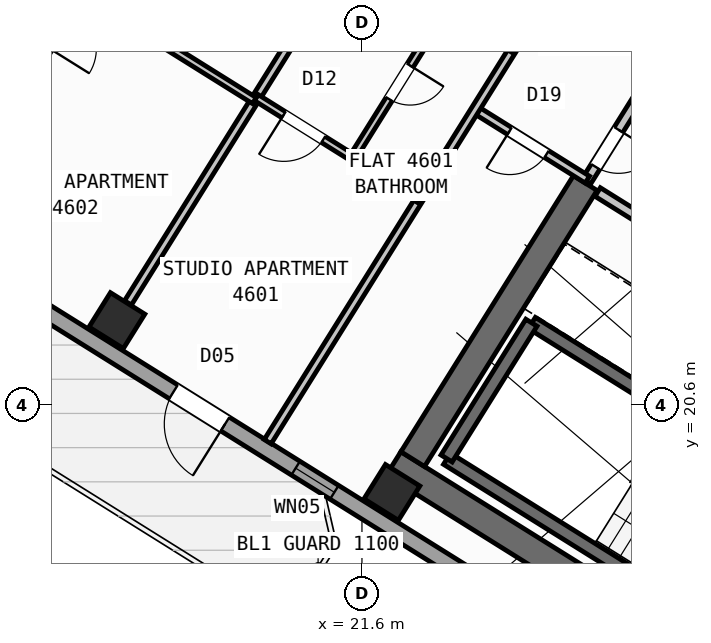
"""IFC4 building model, lengths in metres.
Left out: names, types, materials, properties, quantities, classifications, styles, units other than length and angle.
Written with IfcOpenShell. Run it as: python <this file> out.ifc"""

import sys

from ifc_helpers import new_model, si_unit, direction, frame, frame_2d, origin, origin_2d, place, context, subcontext, project, spatial, rectangle, hollow_rectangle, extrude, source, transform, mapped, element, fill, save


model = new_model("IFC4")
c1 = context("Model", 3, precision=1e-05, world=origin(), true_north=direction((0.0, 1.0)))
c2 = subcontext(c1, "Body", "Model", "MODEL_VIEW")
j1 = project(units=[si_unit("LENGTHUNIT", "METRE"), si_unit("PLANEANGLEUNIT", "RADIAN")], contexts=[c1])
p1 = place(None, origin())
s1 = spatial("IfcSite", under=j1, at=p1, CompositionType="ELEMENT")
p2 = place(p1, origin())
s2 = spatial("IfcBuilding", under=s1, at=p2, CompositionType="ELEMENT")
p3 = place(p2, frame((0.0, 0.0, 184.2)))
s3 = spatial("IfcBuildingStorey", under=s2, at=p3, CompositionType="ELEMENT", Elevation=184.2)
p4 = place(p3, frame((33.366, 12.477, 0.0), z_axis=(0.0, 0.0, 1.0), x_axis=(-0.848047359947, 0.529920442413, 0.0)))
e1 = element("IfcWall", 1, at=p4, inside=s3, PredefinedType="SHEAR", context=c2, shape_type="SweptSolid", body=[
    extrude(rectangle(XDim=13.14, YDim=0.55, at=frame_2d((6.57, 0.0))), origin(), (0.0, 0.0, 1.0), 3.35),
])
p5 = place(p3, frame((26.007, 24.976, 0.0), z_axis=(0.0, 0.0, 1.0), x_axis=(-0.529923795287, -0.848045264823, 0.0)))
e2 = element("IfcWall", 2, at=p5, inside=s3, PredefinedType="SHEAR", context=c2, shape_type="SweptSolid", body=[
    extrude(rectangle(XDim=6.425, YDim=0.55, at=frame_2d((3.212, 0.0))), origin(), (0.0, 0.0, 1.0), 3.35),
])
m1 = source(origin(), c2, "Body", "SweptSolid", [
    extrude(hollow_rectangle(XDim=0.8, YDim=0.8, WallThickness=0.032, at=origin_2d()), origin(), (0.0, 0.0, 1.0), 3.6),
])
for number, where, z_axis, x_axis in (
    (3, (22.191, 18.87, 0.0), (0.0, 0.0, 1.0), (-0.848, 0.53, 0.0)),
    (4, (16.764, 22.261, 0.0), (0.0, 0.0, 1.0), (-0.848, 0.53, 0.0)),
):
    element("IfcColumn", number, at=place(p3, frame(where, z_axis=z_axis, x_axis=x_axis)), inside=s3, PredefinedType="COLUMN", context=c2, shape_type="MappedRepresentation", body=[
        mapped(m1, transform((0.0, 0.0, 0.0), scale=1.0)),
    ])
p6 = place(p3, frame((31.76, 12.183, 0.0), z_axis=(0.0, 0.0, 1.0), x_axis=(-0.848047074256, 0.529920899612, 0.0)))
e5 = element("IfcWall", 5, at=p6, inside=s3, PredefinedType="STANDARD", context=c2, shape_type="SweptSolid", body=[
    extrude(rectangle(XDim=30.652, YDim=0.32, at=frame_2d((15.326, 0.0))), origin(), (0.0, 0.0, 1.0), 3.35),
])
p7 = place(p6, frame((15.166, 0.0, 0.0)))
e6 = element("IfcOpeningElement", 6, at=p7, cuts=e5, PredefinedType="OPENING", context=c2, shape_type="SweptSolid", body=[
    extrude(rectangle(XDim=1.2, YDim=2.15, at=frame_2d((0.6, 1.075))), frame((0.0, 0.17, 0.0), z_axis=(0.0, -1.0, 0.0), x_axis=(1.0, 0.0, 0.0)), (0.0, 0.0, 1.0), 0.34),
])
p8 = place(p6, frame((2.015, 0.0, 0.8)))
e7 = element("IfcOpeningElement", 7, at=p8, cuts=e5, PredefinedType="OPENING", context=c2, shape_type="SweptSolid", body=[
    extrude(rectangle(XDim=2.1, YDim=1.55, at=frame_2d((1.05, 0.775))), frame((0.0, 0.17, 0.0), z_axis=(0.0, -1.0, 0.0), x_axis=(1.0, 0.0, 0.0)), (0.0, 0.0, 1.0), 0.34),
])
p9 = place(p6, frame((7.244, 0.0, 0.8)))
e8 = element("IfcOpeningElement", 8, at=p9, cuts=e5, PredefinedType="OPENING", context=c2, shape_type="SweptSolid", body=[
    extrude(rectangle(XDim=2.1, YDim=1.55, at=frame_2d((1.05, 0.775))), frame((0.0, 0.17, 0.0), z_axis=(0.0, -1.0, 0.0), x_axis=(1.0, 0.0, 0.0)), (0.0, 0.0, 1.0), 0.34),
])
p10 = place(p6, frame((12.623, 0.0, 1.0)))
e9 = element("IfcOpeningElement", 9, at=p10, cuts=e5, PredefinedType="OPENING", context=c2, shape_type="SweptSolid", body=[
    extrude(rectangle(XDim=0.9, YDim=1.25, at=frame_2d((0.45, 0.625))), frame((0.0, 0.17, 0.0), z_axis=(0.0, -1.0, 0.0), x_axis=(1.0, 0.0, 0.0)), (0.0, 0.0, 1.0), 0.34),
])
p11 = place(p6, frame((19.565, 0.0, 0.95)))
e10 = element("IfcOpeningElement", 10, at=p11, cuts=e5, PredefinedType="OPENING", context=c2, shape_type="SweptSolid", body=[
    extrude(rectangle(XDim=1.2, YDim=1.4, at=frame_2d((0.6, 0.7))), frame((0.0, 0.17, 0.0), z_axis=(0.0, -1.0, 0.0), x_axis=(1.0, 0.0, 0.0)), (0.0, 0.0, 1.0), 0.34),
])
p12 = place(p6, frame((25.983, 0.0, 1.0)))
e11 = element("IfcOpeningElement", 11, at=p12, cuts=e5, PredefinedType="OPENING", context=c2, shape_type="SweptSolid", body=[
    extrude(rectangle(XDim=0.9, YDim=1.25, at=frame_2d((0.45, 0.625))), frame((0.0, 0.17, 0.0), z_axis=(0.0, -1.0, 0.0), x_axis=(1.0, 0.0, 0.0)), (0.0, 0.0, 1.0), 0.34),
])
p13 = place(p6, frame((28.433, 0.0, 1.0)))
e12 = element("IfcOpeningElement", 12, at=p13, cuts=e5, PredefinedType="OPENING", context=c2, shape_type="SweptSolid", body=[
    extrude(rectangle(XDim=0.9, YDim=1.25, at=frame_2d((0.45, 0.625))), frame((0.0, 0.17, 0.0), z_axis=(0.0, -1.0, 0.0), x_axis=(1.0, 0.0, 0.0)), (0.0, 0.0, 1.0), 0.34),
])
p14 = place(p3, frame((29.605, 15.581, 0.0), z_axis=(0.0, 0.0, 1.0), x_axis=(-0.848036911448, 0.529937163087, 0.0)))
e13 = element("IfcWall", 13, at=p14, inside=s3, PredefinedType="SHEAR", context=c2, shape_type="SweptSolid", body=[
    extrude(rectangle(XDim=7.46, YDim=0.26, at=frame_2d((3.73, 0.0))), origin(), (0.0, 0.0, 1.0), 3.35),
])
p15 = place(p3, frame((31.28, 18.261, 0.0), z_axis=(0.0, 0.0, 1.0), x_axis=(-0.848051618787, 0.529913626805, 0.0)))
e14 = element("IfcWall", 14, at=p15, inside=s3, PredefinedType="SHEAR", context=c2, shape_type="SweptSolid", body=[
    extrude(rectangle(XDim=7.46, YDim=0.26, at=frame_2d((3.73, 0.0))), origin(), (0.0, 0.0, 1.0), 3.35),
])
p16 = place(p15, frame((0.36, 0.0, 0.0)))
e15 = element("IfcOpeningElement", 15, at=p16, cuts=e14, PredefinedType="OPENING", context=c2, shape_type="SweptSolid", body=[
    extrude(rectangle(XDim=0.86, YDim=2.05, at=frame_2d((0.43, 1.025))), frame((0.0, 0.14, 0.0), z_axis=(0.0, -1.0, 0.0), x_axis=(1.0, 0.0, 0.0)), (0.0, 0.0, 1.0), 0.28),
])
p17 = place(p3, frame((24.945, 22.22, 0.0), z_axis=(0.0, 0.0, 1.0), x_axis=(-0.529908658664, -0.84805472316, 0.0)))
e16 = element("IfcWall", 16, at=p17, inside=s3, PredefinedType="SHEAR", context=c2, shape_type="SweptSolid", body=[
    extrude(rectangle(XDim=3.16, YDim=0.26, at=frame_2d((1.58, 0.0))), origin(), (0.0, 0.0, 1.0), 3.35),
])
p18 = place(p3, frame((31.525, 21.504, 0.0), z_axis=(0.0, 0.0, 1.0), x_axis=(-0.848040211232, 0.529931882541, 0.0)))
e17 = element("IfcWall", 17, at=p18, inside=s3, PredefinedType="STANDARD", context=c2, shape_type="SweptSolid", body=[
    extrude(rectangle(XDim=6.218, YDim=0.2, at=frame_2d((3.109, 0.0))), origin(), (0.0, 0.0, 1.0), 3.34),
])
p19 = place(p18, frame((4.4, 0.0, 0.0)))
e18 = element("IfcOpeningElement", 18, at=p19, cuts=e17, PredefinedType="OPENING", context=c2, shape_type="SweptSolid", body=[
    extrude(rectangle(XDim=0.86, YDim=2.05, at=frame_2d((0.43, 1.025))), frame((0.0, 0.11, 0.0), z_axis=(0.0, -1.0, 0.0), x_axis=(1.0, 0.0, 0.0)), (0.0, 0.0, 1.0), 0.22),
])
p20 = place(p18, frame((1.45, 0.0, 0.0)))
e19 = element("IfcOpeningElement", 19, at=p20, cuts=e17, PredefinedType="OPENING", context=c2, shape_type="SweptSolid", body=[
    extrude(rectangle(XDim=0.86, YDim=2.05, at=frame_2d((0.43, 1.025))), frame((0.0, 0.11, 0.0), z_axis=(0.0, -1.0, 0.0), x_axis=(1.0, 0.0, 0.0)), (0.0, 0.0, 1.0), 0.22),
])
p21 = place(p3, frame((27.596, 27.52, 0.0), z_axis=(0.0, 0.0, 1.0), x_axis=(-0.529865479138, -0.848081702443, 0.0)))
e20 = element("IfcWall", 20, at=p21, inside=s3, PredefinedType="STANDARD", context=c2, shape_type="SweptSolid", body=[
    extrude(rectangle(XDim=2.96, YDim=0.2, at=frame_2d((1.48, 0.0))), origin(), (0.0, 0.0, 1.0), 3.34),
])
p22 = place(p21, frame((1.76, 0.0, 0.0)))
e21 = element("IfcOpeningElement", 21, at=p22, cuts=e20, PredefinedType="OPENING", context=c2, shape_type="SweptSolid", body=[
    extrude(rectangle(XDim=0.86, YDim=2.05, at=frame_2d((0.43, 1.025))), frame((0.0, 0.11, 0.0), z_axis=(0.0, -1.0, 0.0), x_axis=(1.0, 0.0, 0.0)), (0.0, 0.0, 1.0), 0.22),
])
p23 = place(p3, frame((26.049, 25.044, 0.0), z_axis=(0.0, 0.0, 1.0), x_axis=(-0.848050851465, 0.529914854792, 0.0)))
e22 = element("IfcWall", 22, at=p23, inside=s3, PredefinedType="PARTITIONING", context=c2, shape_type="SweptSolid", body=[
    extrude(rectangle(XDim=2.61, YDim=0.16, at=frame_2d((1.305, 0.0))), origin(), (0.0, 0.0, 1.0), 2.825),
])
p24 = place(p23, frame((0.95, 0.0, 0.0)))
e23 = element("IfcOpeningElement", 23, at=p24, cuts=e22, PredefinedType="OPENING", context=c2, shape_type="SweptSolid", body=[
    extrude(rectangle(XDim=0.86, YDim=2.05, at=frame_2d((0.43, 1.025))), frame((0.0, 0.09, 0.0), z_axis=(0.0, -1.0, 0.0), x_axis=(1.0, 0.0, 0.0)), (0.0, 0.0, 1.0), 0.18),
])
p25 = place(p3, frame((24.588, 27.631, 0.0), z_axis=(0.0, 0.0, 1.0), x_axis=(-0.529914992377, -0.848050765494, 0.0)))
e24 = element("IfcWall", 24, at=p25, inside=s3, PredefinedType="PARTITIONING", context=c2, shape_type="SweptSolid", body=[
    extrude(rectangle(XDim=9.15, YDim=0.16, at=frame_2d((4.575, 0.0))), origin(), (0.0, 0.0, 1.0), 3.34),
])
p26 = place(p3, frame((20.414, 28.103, 0.0), z_axis=(0.0, 0.0, 1.0), x_axis=(-0.529934553702, -0.848038542045, 0.0)))
e25 = element("IfcWall", 25, at=p26, inside=s3, PredefinedType="PARTITIONING", context=c2, shape_type="SweptSolid", body=[
    extrude(rectangle(XDim=6.476, YDim=0.16, at=frame_2d((3.238, 0.0))), origin(), (0.0, 0.0, 1.0), 2.825),
])
p27 = place(p3, frame((22.728, 24.654, 0.0), z_axis=(0.0, 0.0, 1.0), x_axis=(-0.848059820872, 0.529900500304, 0.0)))
e26 = element("IfcWall", 26, at=p27, inside=s3, PredefinedType="PLUMBINGWALL", context=c2, shape_type="SweptSolid", body=[
    extrude(rectangle(XDim=3.79, YDim=0.14, at=frame_2d((1.895, 0.0))), origin(), (0.0, 0.0, 1.0), 3.34),
])
p28 = place(p27, frame((2.23, 0.0, 0.0)))
e27 = element("IfcOpeningElement", 27, at=p28, cuts=e26, PredefinedType="OPENING", context=c2, shape_type="SweptSolid", body=[
    extrude(rectangle(XDim=0.92, YDim=2.08, at=frame_2d((0.46, 1.04))), frame((0.0, 0.08, 0.0), z_axis=(0.0, -1.0, 0.0), x_axis=(1.0, 0.0, 0.0)), (0.0, 0.0, 1.0), 0.16),
])
p29 = place(p3, frame((23.273, 28.452, 0.0), z_axis=(0.0, 0.0, 1.0), x_axis=(-0.529867639402, -0.848080352747, 0.0)))
e28 = element("IfcWall", 28, at=p29, inside=s3, PredefinedType="PLUMBINGWALL", context=c2, shape_type="SweptSolid", body=[
    extrude(rectangle(XDim=3.51, YDim=0.14, at=frame_2d((1.755, 0.0))), origin(), (0.0, 0.0, 1.0), 2.995),
])
p30 = place(p29, frame((1.365, 0.0, 0.0)))
e29 = element("IfcOpeningElement", 29, at=p30, cuts=e28, PredefinedType="OPENING", context=c2, shape_type="SweptSolid", body=[
    extrude(rectangle(XDim=0.78, YDim=2.05, at=frame_2d((0.39, 1.025))), frame((0.0, 0.08, 0.0), z_axis=(0.0, -1.0, 0.0), x_axis=(1.0, 0.0, 0.0)), (0.0, 0.0, 1.0), 0.16),
])
p31 = place(p3, frame((19.477, 26.603, 0.0), z_axis=(0.0, 0.0, 1.0), x_axis=(-0.848039019877, 0.529933789039, 0.0)))
e30 = element("IfcWall", 30, at=p31, inside=s3, PredefinedType="PLUMBINGWALL", context=c2, shape_type="SweptSolid", body=[
    extrude(rectangle(XDim=6.4, YDim=0.14, at=frame_2d((3.2, 0.0))), origin(), (0.0, 0.0, 1.0), 3.34),
])
p32 = place(p31, frame((2.824, 0.0, 0.0)))
e31 = element("IfcOpeningElement", 31, at=p32, cuts=e30, PredefinedType="OPENING", context=c2, shape_type="SweptSolid", body=[
    extrude(rectangle(XDim=0.78, YDim=2.05, at=frame_2d((0.39, 1.025))), frame((0.0, 0.08, 0.0), z_axis=(0.0, -1.0, 0.0), x_axis=(1.0, 0.0, 0.0)), (0.0, 0.0, 1.0), 0.16),
])
p33 = place(p3, frame((16.112, 28.706, 0.0), z_axis=(0.0, 0.0, 1.0), x_axis=(-0.529916267533, -0.848049968695, 0.0)))
e32 = element("IfcWall", 32, at=p33, inside=s3, PredefinedType="PARTITIONING", context=c2, shape_type="SweptSolid", body=[
    extrude(rectangle(XDim=5.84, YDim=0.11, at=frame_2d((2.92, 0.0))), origin(), (0.0, 0.0, 1.0), 3.34),
])
p34 = place(p33, frame((0.35, 0.0, 0.0)))
e33 = element("IfcOpeningElement", 33, at=p34, cuts=e32, PredefinedType="OPENING", context=c2, shape_type="SweptSolid", body=[
    extrude(rectangle(XDim=0.92, YDim=2.08, at=frame_2d((0.46, 1.04))), frame((0.0, 0.065, 0.0), z_axis=(0.0, -1.0, 0.0), x_axis=(1.0, 0.0, 0.0)), (0.0, 0.0, 1.0), 0.13),
])
m2 = source(origin(), c2, "Body", "SweptSolid", [
    extrude(rectangle(XDim=1.2, YDim=2.15, at=frame_2d((0.6, 1.075))), frame((0.0, 0.025, 0.0), z_axis=(0.0, -1.0, 0.0), x_axis=(1.0, 0.0, 0.0)), (0.0, 0.0, 1.0), 0.05),
])
p35 = place(p7, origin())
e34 = element("IfcDoor", 34, at=p35, inside=s3, OperationType="SINGLE_SWING_LEFT", PredefinedType="DOOR", context=c2, shape_type="MappedRepresentation", body=[
    mapped(m2, transform((0.0, 0.0, 0.0), scale=1.0)),
])
fill(e6, e34)
m3 = source(origin(), c2, "Body", "SweptSolid", [
    extrude(rectangle(XDim=0.9, YDim=1.25, at=frame_2d((0.45, 0.625))), frame((0.0, 0.03, 0.0), z_axis=(0.0, -1.0, 0.0), x_axis=(1.0, 0.0, 0.0)), (0.0, 0.0, 1.0), 0.06),
])
p36 = place(p10, origin())
e35 = element("IfcWindow", 35, at=p36, inside=s3, PartitioningType="SINGLE_PANEL", PredefinedType="WINDOW", context=c2, shape_type="MappedRepresentation", body=[
    mapped(m3, transform((0.0, 0.0, 0.0), scale=1.0)),
])
fill(e9, e35)
m4 = source(origin(), c2, "Body", "SweptSolid", [
    extrude(rectangle(XDim=0.86, YDim=2.05, at=frame_2d((0.43, 1.025))), frame((0.0, 0.025, 0.0), z_axis=(0.0, -1.0, 0.0), x_axis=(1.0, 0.0, 0.0)), (0.0, 0.0, 1.0), 0.05),
])
p37 = place(p24, origin())
e36 = element("IfcDoor", 36, at=p37, inside=s3, OperationType="SINGLE_SWING_RIGHT", PredefinedType="DOOR", context=c2, shape_type="MappedRepresentation", body=[
    mapped(m4, transform((0.0, 0.0, 0.0), scale=1.0)),
])
fill(e23, e36)
p38 = place(p22, origin())
e37 = element("IfcDoor", 37, at=p38, inside=s3, OperationType="SINGLE_SWING_LEFT", PredefinedType="DOOR", context=c2, shape_type="MappedRepresentation", body=[
    mapped(m4, transform((0.0, 0.0, 0.0), scale=1.0)),
])
fill(e21, e37)
m5 = source(origin(), c2, "Body", "SweptSolid", [
    extrude(rectangle(XDim=0.92, YDim=2.08, at=frame_2d((0.46, 1.04))), frame((0.0, 0.025, 0.0), z_axis=(0.0, -1.0, 0.0), x_axis=(1.0, 0.0, 0.0)), (0.0, 0.0, 1.0), 0.05),
])
p39 = place(p28, origin())
e38 = element("IfcDoor", 38, at=p39, inside=s3, OperationType="SINGLE_SWING_RIGHT", PredefinedType="DOOR", context=c2, shape_type="MappedRepresentation", body=[
    mapped(m5, transform((0.0, 0.0, 0.0), scale=1.0)),
])
fill(e27, e38)
m6 = source(origin(), c2, "Body", "SweptSolid", [
    extrude(rectangle(XDim=0.78, YDim=2.05, at=frame_2d((0.39, 1.025))), frame((0.0, 0.025, 0.0), z_axis=(0.0, -1.0, 0.0), x_axis=(1.0, 0.0, 0.0)), (0.0, 0.0, 1.0), 0.05),
])
p40 = place(p30, origin())
e39 = element("IfcDoor", 39, at=p40, inside=s3, OperationType="SINGLE_SWING_LEFT", PredefinedType="DOOR", context=c2, shape_type="MappedRepresentation", body=[
    mapped(m6, transform((0.0, 0.0, 0.0), scale=1.0)),
])
fill(e29, e39)
save(model, sys.argv[1])
